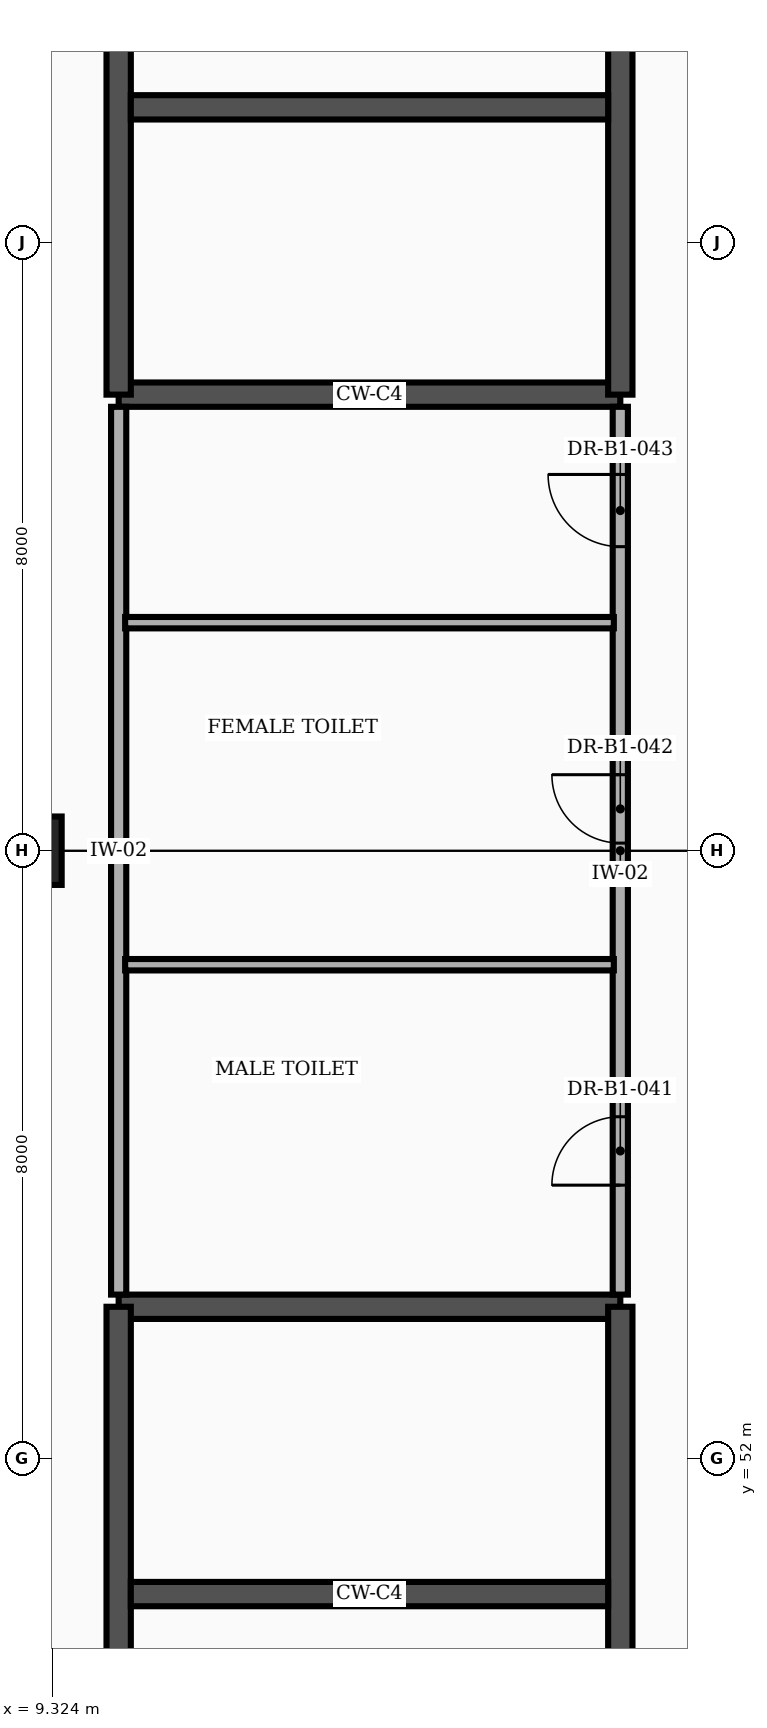
"""IFC4 building model, lengths in metres.
Left out: names, types, materials, properties, quantities, classifications, styles, units other than length and angle.
Written with IfcOpenShell. Run it as: python <this file> out.ifc"""

import sys

from ifc_helpers import new_model, si_unit, direction, frame, frame_2d, origin, origin_2d, place, context, subcontext, project, spatial, rectangle, extrude, element, fill, save


model = new_model("IFC4")
c1 = context("Model", 3, precision=1e-05, world=origin(), true_north=direction((0.0, 1.0)))
c2 = subcontext(c1, "Body", "Model", "MODEL_VIEW")
j1 = project(units=[si_unit("LENGTHUNIT", "METRE"), si_unit("PLANEANGLEUNIT", "RADIAN")], contexts=[c1])
p1 = place(None, origin())
s1 = spatial("IfcSite", under=j1, at=p1, CompositionType="ELEMENT")
p2 = place(p1, origin())
s2 = spatial("IfcBuilding", under=s1, at=p2, CompositionType="ELEMENT")
p3 = place(p2, frame((0.0, 0.0, -4.5)))
s3 = spatial("IfcBuildingStorey", under=s2, at=p3, CompositionType="ELEMENT", Elevation=-4.5)
p4 = place(p3, frame((9.0, 60.0, -0.45), z_axis=(0.0, 0.0, 1.0), x_axis=(1.0, 0.0, 0.0)))
e1 = element("IfcColumn", 1, at=p4, inside=s3, PredefinedType="COLUMN", context=c2, shape_type="SweptSolid", body=[
    extrude(rectangle(XDim=0.9, YDim=0.9, at=origin_2d()), origin(), (0.0, 0.0, 1.0), 4.95),
])
p5 = place(p3, frame((10.2, 54.0, 0.0), z_axis=(0.0, 0.0, 1.0), x_axis=(1.0, 0.0, 0.0)))
e2 = element("IfcWall", 2, at=p5, inside=s3, PredefinedType="SHEAR", context=c2, shape_type="SweptSolid", body=[
    extrude(rectangle(XDim=6.6, YDim=0.32, at=frame_2d((3.3, 0.0))), origin(), (0.0, 0.0, 1.0), 4.24),
])
p6 = place(p3, frame((10.2, 39.4, 0.0), z_axis=(0.0, 0.0, 1.0), x_axis=(0.0, 1.0, 0.0)))
e3 = element("IfcWall", 3, at=p6, inside=s3, PredefinedType="SHEAR", context=c2, shape_type="SweptSolid", body=[
    extrude(rectangle(XDim=14.6, YDim=0.32, at=frame_2d((7.3, 0.0))), origin(), (0.0, 0.0, 1.0), 4.24),
])
p7 = place(p3, frame((16.8, 39.4, 0.0), z_axis=(0.0, 0.0, 1.0), x_axis=(0.0, 1.0, 0.0)))
e4 = element("IfcWall", 4, at=p7, inside=s3, PredefinedType="SHEAR", context=c2, shape_type="SweptSolid", body=[
    extrude(rectangle(XDim=14.6, YDim=0.32, at=frame_2d((7.3, 0.0))), origin(), (0.0, 0.0, 1.0), 4.24),
])
p8 = place(p7, frame((0.55, 0.0, 0.0)))
e5 = element("IfcOpeningElement", 5, at=p8, cuts=e4, PredefinedType="OPENING", context=c2, shape_type="SweptSolid", body=[
    extrude(rectangle(XDim=2.4, YDim=2.25, at=frame_2d((1.2, 1.125))), frame((0.0, 0.172, 0.0), z_axis=(0.0, -1.0, 0.0), x_axis=(1.0, 0.0, 0.0)), (0.0, 0.0, 1.0), 0.344),
])
p9 = place(p3, frame((10.36, 50.22, 0.0), z_axis=(0.0, 0.0, 1.0), x_axis=(1.0, 0.0, 0.0)))
e6 = element("IfcWall", 6, at=p9, inside=s3, PredefinedType="SHEAR", context=c2, shape_type="SweptSolid", body=[
    extrude(rectangle(XDim=6.28, YDim=0.32, at=frame_2d((3.14, 0.0))), origin(), (0.0, 0.0, 1.0), 4.24),
])
p10 = place(p3, frame((10.2, 66.0, 0.0), z_axis=(0.0, 0.0, 1.0), x_axis=(1.0, 0.0, 0.0)))
e7 = element("IfcWall", 7, at=p10, inside=s3, PredefinedType="SHEAR", context=c2, shape_type="SweptSolid", body=[
    extrude(rectangle(XDim=6.6, YDim=0.32, at=frame_2d((3.3, 0.0))), origin(), (0.0, 0.0, 1.0), 4.24),
])
p11 = place(p3, frame((10.2, 66.0, 0.0), z_axis=(0.0, 0.0, 1.0), x_axis=(0.0, 1.0, 0.0)))
e8 = element("IfcWall", 8, at=p11, inside=s3, PredefinedType="SHEAR", context=c2, shape_type="SweptSolid", body=[
    extrude(rectangle(XDim=14.6, YDim=0.32, at=frame_2d((7.3, 0.0))), origin(), (0.0, 0.0, 1.0), 4.24),
])
p12 = place(p3, frame((16.8, 66.0, 0.0), z_axis=(0.0, 0.0, 1.0), x_axis=(0.0, 1.0, 0.0)))
e9 = element("IfcWall", 9, at=p12, inside=s3, PredefinedType="SHEAR", context=c2, shape_type="SweptSolid", body=[
    extrude(rectangle(XDim=14.6, YDim=0.32, at=frame_2d((7.3, 0.0))), origin(), (0.0, 0.0, 1.0), 4.24),
])
p13 = place(p12, frame((11.65, 0.0, 0.0)))
e10 = element("IfcOpeningElement", 10, at=p13, cuts=e9, PredefinedType="OPENING", context=c2, shape_type="SweptSolid", body=[
    extrude(rectangle(XDim=2.4, YDim=2.25, at=frame_2d((1.2, 1.125))), frame((0.0, 0.172, 0.0), z_axis=(0.0, -1.0, 0.0), x_axis=(1.0, 0.0, 0.0)), (0.0, 0.0, 1.0), 0.344),
])
p14 = place(p3, frame((10.36, 69.78, 0.0), z_axis=(0.0, 0.0, 1.0), x_axis=(1.0, 0.0, 0.0)))
e11 = element("IfcWall", 11, at=p14, inside=s3, PredefinedType="SHEAR", context=c2, shape_type="SweptSolid", body=[
    extrude(rectangle(XDim=6.28, YDim=0.32, at=frame_2d((3.14, 0.0))), origin(), (0.0, 0.0, 1.0), 4.24),
])
p15 = place(p3, frame((10.2, 54.16, 0.0), z_axis=(0.0, 0.0, 1.0), x_axis=(0.0, 1.0, 0.0)))
e12 = element("IfcWall", 12, at=p15, inside=s3, PredefinedType="PARTITIONING", context=c2, shape_type="SweptSolid", body=[
    extrude(rectangle(XDim=11.68, YDim=0.2, at=frame_2d((5.84, 0.0))), origin(), (0.0, 0.0, 1.0), 4.24),
])
p16 = place(p3, frame((16.8, 54.16, 0.0), z_axis=(0.0, 0.0, 1.0), x_axis=(0.0, 1.0, 0.0)))
e13 = element("IfcWall", 13, at=p16, inside=s3, PredefinedType="PARTITIONING", context=c2, shape_type="SweptSolid", body=[
    extrude(rectangle(XDim=11.68, YDim=0.2, at=frame_2d((5.84, 0.0))), origin(), (0.0, 0.0, 1.0), 4.24),
])
p17 = place(p16, frame((1.44, 0.0, 0.0)))
e14 = element("IfcOpeningElement", 14, at=p17, cuts=e13, PredefinedType="OPENING", context=c2, shape_type="SweptSolid", body=[
    extrude(rectangle(XDim=0.9, YDim=2.1, at=frame_2d((0.45, 1.05))), frame((0.0, 0.112, 0.0), z_axis=(0.0, -1.0, 0.0), x_axis=(1.0, 0.0, 0.0)), (0.0, 0.0, 1.0), 0.224),
])
p18 = place(p16, frame((5.94, 0.0, 0.0)))
e15 = element("IfcOpeningElement", 15, at=p18, cuts=e13, PredefinedType="OPENING", context=c2, shape_type="SweptSolid", body=[
    extrude(rectangle(XDim=0.9, YDim=2.1, at=frame_2d((0.45, 1.05))), frame((0.0, 0.112, 0.0), z_axis=(0.0, -1.0, 0.0), x_axis=(1.0, 0.0, 0.0)), (0.0, 0.0, 1.0), 0.224),
])
p19 = place(p16, frame((9.84, 0.0, 0.0)))
e16 = element("IfcOpeningElement", 16, at=p19, cuts=e13, PredefinedType="OPENING", context=c2, shape_type="SweptSolid", body=[
    extrude(rectangle(XDim=0.95, YDim=2.1, at=frame_2d((0.475, 1.05))), frame((0.0, 0.112, 0.0), z_axis=(0.0, -1.0, 0.0), x_axis=(1.0, 0.0, 0.0)), (0.0, 0.0, 1.0), 0.224),
])
for number, where, z_axis, x_axis in (
    (17, (10.285, 58.5, 0.0), (0.0, 0.0, 1.0), (1.0, 0.0, 0.0)),
    (18, (10.285, 63.0, 0.0), (0.0, 0.0, 1.0), (1.0, 0.0, 0.0)),
):
    element("IfcWall", number, at=place(p3, frame(where, z_axis=z_axis, x_axis=x_axis)), inside=s3, PredefinedType="PARTITIONING", context=c2, shape_type="SweptSolid", body=[
        extrude(rectangle(XDim=6.43, YDim=0.15, at=frame_2d((3.215, 0.0))), origin(), (0.0, 0.0, 1.0), 4.24),
    ])
p20 = place(p17, origin())
e19 = element("IfcDoor", 19, at=p20, inside=s3, OperationType="SINGLE_SWING_LEFT", PredefinedType="DOOR", context=c2, shape_type="SweptSolid", body=[
    extrude(rectangle(XDim=0.9, YDim=2.1, at=frame_2d((0.45, 1.05))), frame((0.0, 0.025, 0.0), z_axis=(0.0, -1.0, 0.0), x_axis=(1.0, 0.0, 0.0)), (0.0, 0.0, 1.0), 0.05),
])
fill(e14, e19)
p21 = place(p18, origin())
e20 = element("IfcDoor", 20, at=p21, inside=s3, OperationType="SINGLE_SWING_RIGHT", PredefinedType="DOOR", context=c2, shape_type="SweptSolid", body=[
    extrude(rectangle(XDim=0.9, YDim=2.1, at=frame_2d((0.45, 1.05))), frame((0.0, 0.025, 0.0), z_axis=(0.0, -1.0, 0.0), x_axis=(1.0, 0.0, 0.0)), (0.0, 0.0, 1.0), 0.05),
])
fill(e15, e20)
p22 = place(p19, origin())
e21 = element("IfcDoor", 21, at=p22, inside=s3, OperationType="SINGLE_SWING_RIGHT", PredefinedType="DOOR", context=c2, shape_type="SweptSolid", body=[
    extrude(rectangle(XDim=0.95, YDim=2.1, at=frame_2d((0.475, 1.05))), frame((0.0, 0.025, 0.0), z_axis=(0.0, -1.0, 0.0), x_axis=(1.0, 0.0, 0.0)), (0.0, 0.0, 1.0), 0.05),
])
fill(e16, e21)
save(model, sys.argv[1])
